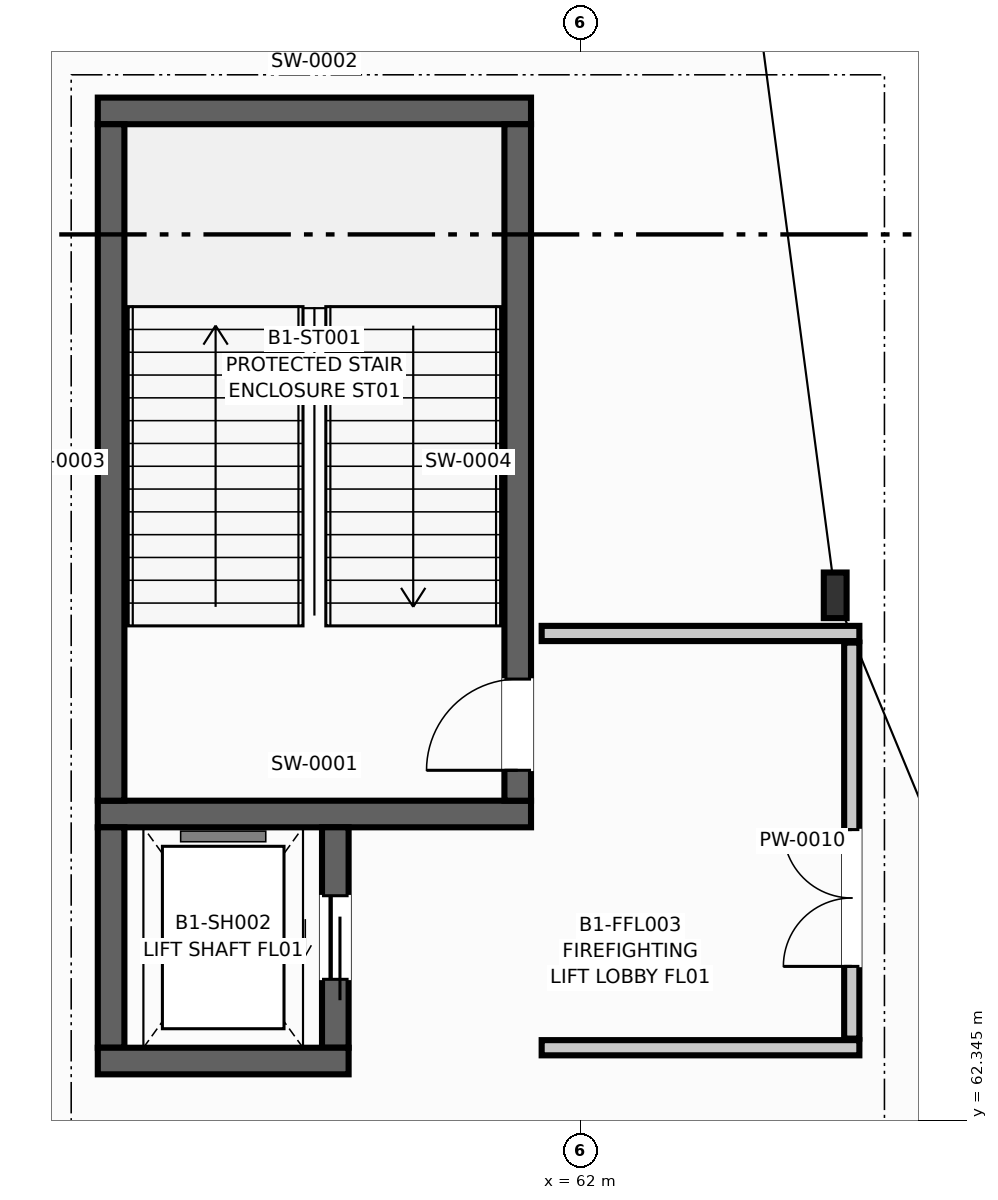
"""IFC4 building model, lengths in metres.
Left out: names, types, materials, properties, quantities, classifications, styles, units other than length and angle.
Written with IfcOpenShell. Run it as: python <this file> out.ifc"""

import sys

from ifc_helpers import new_model, si_unit, direction, frame, frame_2d, origin, origin_2d, place, context, subcontext, project, spatial, rectangle, i_section, extrude, element, fill, save


model = new_model("IFC4")
c1 = context("Model", 3, precision=1e-05, world=origin(), true_north=direction((0.0, 1.0)))
c2 = subcontext(c1, "Body", "Model", "MODEL_VIEW")
j1 = project(units=[si_unit("LENGTHUNIT", "METRE"), si_unit("PLANEANGLEUNIT", "RADIAN")], contexts=[c1])
p1 = place(None, origin())
s1 = spatial("IfcSite", under=j1, at=p1, CompositionType="ELEMENT")
p2 = place(p1, origin())
s2 = spatial("IfcBuilding", under=s1, at=p2, CompositionType="ELEMENT")
p3 = place(p2, frame((0.0, 0.0, -4.5)))
s3 = spatial("IfcBuildingStorey", under=s2, at=p3, CompositionType="ELEMENT", Elevation=-4.5)
p4 = place(p3, frame((65.352, 69.252, -0.55), z_axis=(0.0, 0.0, 1.0), x_axis=(1.0, 0.0, 0.0)))
e1 = element("IfcColumn", 1, at=p4, inside=s3, PredefinedType="COLUMN", context=c2, shape_type="SweptSolid", body=[
    extrude(i_section(OverallWidth=0.3, OverallDepth=0.6, WebThickness=0.015, FlangeThickness=0.03, at=origin_2d()), origin(), (0.0, 0.0, 1.0), 5.05),
])
p5 = place(p3, frame((51.636, 65.577, 0.0), z_axis=(0.0, 0.0, 1.0), x_axis=(0.382656941645, -0.923890504882, 0.0)))
e2 = element("IfcWall", 2, at=p5, inside=s3, PredefinedType="USERDEFINED", context=c2, shape_type="SweptSolid", body=[
    extrude(rectangle(XDim=12.531, YDim=0.54, at=frame_2d((6.265, 0.0))), origin(), (0.0, 0.0, 1.0), 4.225),
])
for number, where, z_axis, x_axis in (
    (3, (55.65, 66.375, 0.0), (0.0, 0.0, 1.0), (1.0, 0.0, 0.0)),
    (4, (55.65, 75.625, 0.0), (0.0, 0.0, 1.0), (1.0, 0.0, 0.0)),
):
    element("IfcWall", number, at=place(p3, frame(where, z_axis=z_axis, x_axis=x_axis)), inside=s3, PredefinedType="SHEAR", context=c2, shape_type="SweptSolid", body=[
        extrude(rectangle(XDim=5.7, YDim=0.35, at=frame_2d((2.85, 0.0))), origin(), (0.0, 0.0, 1.0), 4.225),
    ])
p6 = place(p3, frame((55.825, 66.55, 0.0), z_axis=(0.0, 0.0, 1.0), x_axis=(0.0, 1.0, 0.0)))
e5 = element("IfcWall", 5, at=p6, inside=s3, PredefinedType="SHEAR", context=c2, shape_type="SweptSolid", body=[
    extrude(rectangle(XDim=8.9, YDim=0.35, at=frame_2d((4.45, 0.0))), origin(), (0.0, 0.0, 1.0), 4.225),
])
p7 = place(p3, frame((61.175, 66.55, 0.0), z_axis=(0.0, 0.0, 1.0), x_axis=(0.0, 1.0, 0.0)))
e6 = element("IfcWall", 6, at=p7, inside=s3, PredefinedType="SHEAR", context=c2, shape_type="SweptSolid", body=[
    extrude(rectangle(XDim=8.9, YDim=0.35, at=frame_2d((4.45, 0.0))), origin(), (0.0, 0.0, 1.0), 4.225),
])
p8 = place(p7, frame((0.4, 0.0, 0.0)))
e7 = element("IfcOpeningElement", 7, at=p8, cuts=e6, PredefinedType="OPENING", context=c2, shape_type="SweptSolid", body=[
    extrude(rectangle(XDim=1.2, YDim=2.2, at=frame_2d((0.6, 1.1))), frame((0.0, 0.185, 0.0), z_axis=(0.0, -1.0, 0.0), x_axis=(1.0, 0.0, 0.0)), (0.0, 0.0, 1.0), 0.37),
])
p9 = place(p3, frame((55.825, 63.3, 0.0), z_axis=(0.0, 0.0, 1.0), x_axis=(0.0, 1.0, 0.0)))
e8 = element("IfcWall", 8, at=p9, inside=s3, PredefinedType="SHEAR", context=c2, shape_type="SweptSolid", body=[
    extrude(rectangle(XDim=2.9, YDim=0.35, at=frame_2d((1.45, 0.0))), origin(), (0.0, 0.0, 1.0), 4.225),
])
p10 = place(p3, frame((58.775, 63.3, 0.0), z_axis=(0.0, 0.0, 1.0), x_axis=(0.0, 1.0, 0.0)))
e9 = element("IfcWall", 9, at=p10, inside=s3, PredefinedType="SHEAR", context=c2, shape_type="SweptSolid", body=[
    extrude(rectangle(XDim=2.9, YDim=0.35, at=frame_2d((1.45, 0.0))), origin(), (0.0, 0.0, 1.0), 4.225),
])
p11 = place(p10, frame((0.9, 0.0, 0.0)))
e10 = element("IfcOpeningElement", 10, at=p11, cuts=e9, PredefinedType="OPENING", context=c2, shape_type="SweptSolid", body=[
    extrude(rectangle(XDim=1.1, YDim=2.2, at=frame_2d((0.55, 1.1))), frame((0.0, 0.185, 0.0), z_axis=(0.0, -1.0, 0.0), x_axis=(1.0, 0.0, 0.0)), (0.0, 0.0, 1.0), 0.37),
])
p12 = place(p3, frame((55.65, 63.125, 0.0), z_axis=(0.0, 0.0, 1.0), x_axis=(1.0, 0.0, 0.0)))
e11 = element("IfcWall", 11, at=p12, inside=s3, PredefinedType="SHEAR", context=c2, shape_type="SweptSolid", body=[
    extrude(rectangle(XDim=3.3, YDim=0.35, at=frame_2d((1.65, 0.0))), origin(), (0.0, 0.0, 1.0), 4.225),
])
for number, where, z_axis, x_axis in (
    (12, (61.49, 63.3, 0.0), (0.0, 0.0, 1.0), (1.0, 0.0, 0.0)),
    (13, (61.49, 68.75, 0.0), (0.0, 0.0, 1.0), (1.0, 0.0, 0.0)),
):
    element("IfcWall", number, at=place(p3, frame(where, z_axis=z_axis, x_axis=x_axis)), inside=s3, PredefinedType="PARTITIONING", context=c2, shape_type="SweptSolid", body=[
        extrude(rectangle(XDim=4.18, YDim=0.2, at=frame_2d((2.09, 0.0))), origin(), (0.0, 0.0, 1.0), 3.22),
    ])
p13 = place(p3, frame((65.57, 63.42, 0.0), z_axis=(0.0, 0.0, 1.0), x_axis=(0.0, 1.0, 0.0)))
e14 = element("IfcWall", 14, at=p13, inside=s3, PredefinedType="PARTITIONING", context=c2, shape_type="SweptSolid", body=[
    extrude(rectangle(XDim=5.21, YDim=0.2, at=frame_2d((2.605, 0.0))), origin(), (0.0, 0.0, 1.0), 3.22),
])
p14 = place(p13, frame((0.95, 0.0, 0.0)))
e15 = element("IfcOpeningElement", 15, at=p14, cuts=e14, PredefinedType="OPENING", context=c2, shape_type="SweptSolid", body=[
    extrude(rectangle(XDim=1.8, YDim=2.2, at=frame_2d((0.9, 1.1))), frame((0.0, 0.11, 0.0), z_axis=(0.0, -1.0, 0.0), x_axis=(1.0, 0.0, 0.0)), (0.0, 0.0, 1.0), 0.22),
])
p15 = place(p8, origin())
e16 = element("IfcDoor", 16, at=p15, inside=s3, OperationType="SINGLE_SWING_LEFT", PredefinedType="DOOR", context=c2, shape_type="SweptSolid", body=[
    extrude(rectangle(XDim=1.2, YDim=2.2, at=frame_2d((0.6, 1.1))), frame((0.0, 0.025, 0.0), z_axis=(0.0, -1.0, 0.0), x_axis=(1.0, 0.0, 0.0)), (0.0, 0.0, 1.0), 0.05),
])
fill(e7, e16)
p16 = place(p11, origin())
e17 = element("IfcDoor", 17, at=p16, inside=s3, OperationType="SLIDING_TO_LEFT", PredefinedType="DOOR", context=c2, shape_type="SweptSolid", body=[
    extrude(rectangle(XDim=1.1, YDim=2.2, at=frame_2d((0.55, 1.1))), frame((0.0, 0.025, 0.0), z_axis=(0.0, -1.0, 0.0), x_axis=(1.0, 0.0, 0.0)), (0.0, 0.0, 1.0), 0.05),
])
fill(e10, e17)
p17 = place(p14, origin())
e18 = element("IfcDoor", 18, at=p17, inside=s3, OperationType="DOUBLE_DOOR_SINGLE_SWING", PredefinedType="DOOR", context=c2, shape_type="SweptSolid", body=[
    extrude(rectangle(XDim=1.8, YDim=2.2, at=frame_2d((0.9, 1.1))), frame((0.0, 0.025, 0.0), z_axis=(0.0, -1.0, 0.0), x_axis=(1.0, 0.0, 0.0)), (0.0, 0.0, 1.0), 0.05),
])
fill(e15, e18)
save(model, sys.argv[1])
